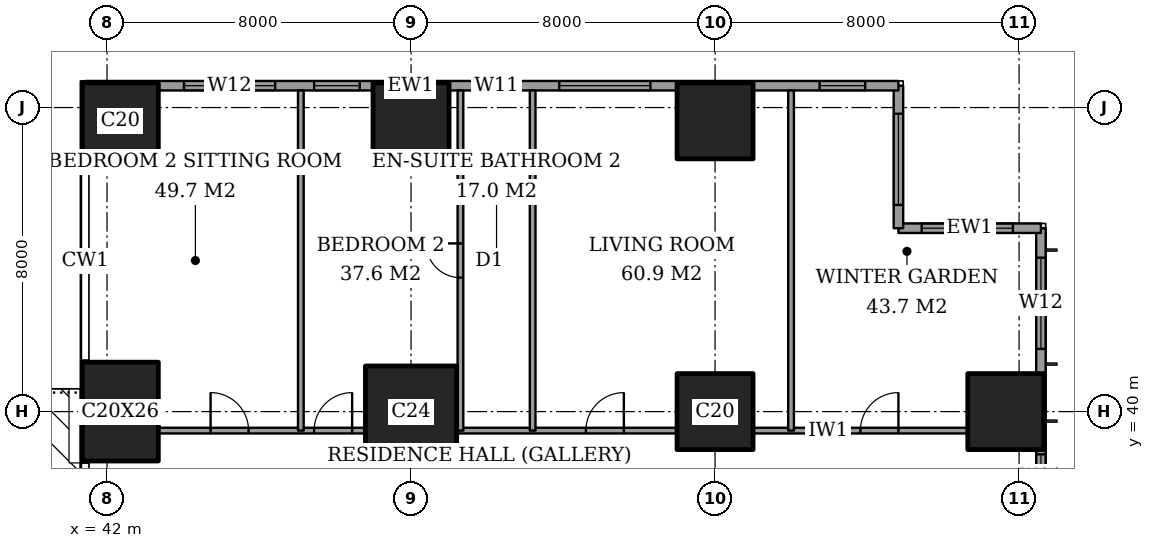
"""IFC4 building model, lengths in metres.
Left out: names, types, materials, properties, quantities, classifications, styles, units other than length and angle.
Written with IfcOpenShell. Run it as: python <this file> out.ifc"""

import sys

from ifc_helpers import new_model, si_unit, direction, frame, frame_2d, origin, origin_2d, place, context, subcontext, project, spatial, rectangle, extrude, element, fill, save


model = new_model("IFC4")
c1 = context("Model", 3, precision=1e-05, world=origin(), true_north=direction((0.0, 1.0)))
c2 = subcontext(c1, "Body", "Model", "MODEL_VIEW")
j1 = project(units=[si_unit("LENGTHUNIT", "METRE"), si_unit("PLANEANGLEUNIT", "RADIAN")], contexts=[c1])
p1 = place(None, origin())
s1 = spatial("IfcSite", under=j1, at=p1, CompositionType="ELEMENT")
p2 = place(p1, origin())
s2 = spatial("IfcBuilding", under=s1, at=p2, CompositionType="ELEMENT")
p3 = place(p2, frame((0.0, 0.0, 96.2)))
s3 = spatial("IfcBuildingStorey", under=s2, at=p3, CompositionType="ELEMENT", Elevation=96.2)
p4 = place(p3, frame((42.35, 40.0, 0.0), z_axis=(0.0, 0.0, 1.0), x_axis=(1.0, 0.0, 0.0)))
e1 = element("IfcColumn", 1, at=p4, inside=s3, PredefinedType="COLUMN", context=c2, shape_type="SweptSolid", body=[
    extrude(rectangle(XDim=2.0, YDim=2.6, at=origin_2d()), origin(), (0.0, 0.0, 1.0), 3.6),
])
p5 = place(p3, frame((42.35, 47.65, 0.0), z_axis=(0.0, 0.0, 1.0), x_axis=(1.0, 0.0, 0.0)))
e2 = element("IfcColumn", 2, at=p5, inside=s3, PredefinedType="COLUMN", context=c2, shape_type="SweptSolid", body=[
    extrude(rectangle(XDim=2.0, YDim=2.0, at=origin_2d()), origin(), (0.0, 0.0, 1.0), 3.6),
])
p6 = place(p3, frame((50.0, 40.0, 0.0), z_axis=(0.0, 0.0, 1.0), x_axis=(1.0, 0.0, 0.0)))
e3 = element("IfcColumn", 3, at=p6, inside=s3, PredefinedType="COLUMN", context=c2, shape_type="SweptSolid", body=[
    extrude(rectangle(XDim=2.4, YDim=2.4, at=origin_2d()), origin(), (0.0, 0.0, 1.0), 3.6),
])
for number, where, z_axis, x_axis in (
    (4, (50.0, 47.65, 0.0), (0.0, 0.0, 1.0), (1.0, 0.0, 0.0)),
    (5, (58.0, 40.0, 0.0), (0.0, 0.0, 1.0), (1.0, 0.0, 0.0)),
    (6, (58.0, 47.65, 0.0), (0.0, 0.0, 1.0), (1.0, 0.0, 0.0)),
    (7, (65.65, 40.0, 0.0), (0.0, 0.0, 1.0), (1.0, 0.0, 0.0)),
):
    element("IfcColumn", number, at=place(p3, frame(where, z_axis=z_axis, x_axis=x_axis)), inside=s3, PredefinedType="COLUMN", context=c2, shape_type="SweptSolid", body=[
        extrude(rectangle(XDim=2.0, YDim=2.0, at=origin_2d()), origin(), (0.0, 0.0, 1.0), 3.6),
    ])
p7 = place(p3, frame((66.575, 3.175, 0.0), z_axis=(0.0, 0.0, 1.0), x_axis=(0.0, 1.0, 0.0)))
e8 = element("IfcWall", 8, at=p7, inside=s3, PredefinedType="SOLIDWALL", context=c2, shape_type="SweptSolid", body=[
    extrude(rectangle(XDim=41.65, YDim=0.25, at=frame_2d((20.825, 0.0))), origin(), (0.0, 0.0, 1.0), 3.6),
])
p8 = place(p7, frame((0.775, 0.0, 0.4)))
e9 = element("IfcOpeningElement", 9, at=p8, cuts=e8, PredefinedType="OPENING", context=c2, shape_type="SweptSolid", body=[
    extrude(rectangle(XDim=2.4, YDim=2.2, at=frame_2d((1.2, 1.1))), frame((0.0, 0.135, 0.0), z_axis=(0.0, -1.0, 0.0), x_axis=(1.0, 0.0, 0.0)), (0.0, 0.0, 1.0), 0.27),
])
p9 = place(p7, frame((6.1, 0.0, 0.4)))
e10 = element("IfcOpeningElement", 10, at=p9, cuts=e8, PredefinedType="OPENING", context=c2, shape_type="SweptSolid", body=[
    extrude(rectangle(XDim=1.2, YDim=2.2, at=frame_2d((0.6, 1.1))), frame((0.0, 0.135, 0.0), z_axis=(0.0, -1.0, 0.0), x_axis=(1.0, 0.0, 0.0)), (0.0, 0.0, 1.0), 0.27),
])
p10 = place(p7, frame((8.275, 0.0, 0.4)))
e11 = element("IfcOpeningElement", 11, at=p10, cuts=e8, PredefinedType="OPENING", context=c2, shape_type="SweptSolid", body=[
    extrude(rectangle(XDim=2.4, YDim=2.2, at=frame_2d((1.2, 1.1))), frame((0.0, 0.135, 0.0), z_axis=(0.0, -1.0, 0.0), x_axis=(1.0, 0.0, 0.0)), (0.0, 0.0, 1.0), 0.27),
])
p11 = place(p7, frame((15.775, 0.0, 0.4)))
e12 = element("IfcOpeningElement", 12, at=p11, cuts=e8, PredefinedType="OPENING", context=c2, shape_type="SweptSolid", body=[
    extrude(rectangle(XDim=2.4, YDim=2.2, at=frame_2d((1.2, 1.1))), frame((0.0, 0.135, 0.0), z_axis=(0.0, -1.0, 0.0), x_axis=(1.0, 0.0, 0.0)), (0.0, 0.0, 1.0), 0.27),
])
p12 = place(p7, frame((23.475, 0.0, 0.4)))
e13 = element("IfcOpeningElement", 13, at=p12, cuts=e8, PredefinedType="OPENING", context=c2, shape_type="SweptSolid", body=[
    extrude(rectangle(XDim=2.4, YDim=2.2, at=frame_2d((1.2, 1.1))), frame((0.0, 0.135, 0.0), z_axis=(0.0, -1.0, 0.0), x_axis=(1.0, 0.0, 0.0)), (0.0, 0.0, 1.0), 0.27),
])
p13 = place(p7, frame((30.975, 0.0, 0.4)))
e14 = element("IfcOpeningElement", 14, at=p13, cuts=e8, PredefinedType="OPENING", context=c2, shape_type="SweptSolid", body=[
    extrude(rectangle(XDim=2.4, YDim=2.2, at=frame_2d((1.2, 1.1))), frame((0.0, 0.135, 0.0), z_axis=(0.0, -1.0, 0.0), x_axis=(1.0, 0.0, 0.0)), (0.0, 0.0, 1.0), 0.27),
])
p14 = place(p7, frame((34.5, 0.0, 0.4)))
e15 = element("IfcOpeningElement", 15, at=p14, cuts=e8, PredefinedType="OPENING", context=c2, shape_type="SweptSolid", body=[
    extrude(rectangle(XDim=1.2, YDim=2.2, at=frame_2d((0.6, 1.1))), frame((0.0, 0.135, 0.0), z_axis=(0.0, -1.0, 0.0), x_axis=(1.0, 0.0, 0.0)), (0.0, 0.0, 1.0), 0.27),
])
p15 = place(p7, frame((38.475, 0.0, 0.4)))
e16 = element("IfcOpeningElement", 16, at=p15, cuts=e8, PredefinedType="OPENING", context=c2, shape_type="SweptSolid", body=[
    extrude(rectangle(XDim=2.4, YDim=2.2, at=frame_2d((1.2, 1.1))), frame((0.0, 0.135, 0.0), z_axis=(0.0, -1.0, 0.0), x_axis=(1.0, 0.0, 0.0)), (0.0, 0.0, 1.0), 0.27),
])
p16 = place(p3, frame((66.575, 44.825, 0.0), z_axis=(0.0, 0.0, 1.0), x_axis=(-1.0, 0.0, 0.0)))
e17 = element("IfcWall", 17, at=p16, inside=s3, PredefinedType="SOLIDWALL", context=c2, shape_type="SweptSolid", body=[
    extrude(rectangle(XDim=3.75, YDim=0.25, at=frame_2d((1.875, 0.0))), origin(), (0.0, 0.0, 1.0), 3.6),
])
p17 = place(p16, frame((0.738, 0.0, 0.4)))
e18 = element("IfcOpeningElement", 18, at=p17, cuts=e17, PredefinedType="OPENING", context=c2, shape_type="SweptSolid", body=[
    extrude(rectangle(XDim=2.4, YDim=2.2, at=frame_2d((1.2, 1.1))), frame((0.0, 0.135, 0.0), z_axis=(0.0, -1.0, 0.0), x_axis=(1.0, 0.0, 0.0)), (0.0, 0.0, 1.0), 0.27),
])
p18 = place(p3, frame((62.825, 44.825, 0.0), z_axis=(0.0, 0.0, 1.0), x_axis=(0.0, 1.0, 0.0)))
e19 = element("IfcWall", 19, at=p18, inside=s3, PredefinedType="SOLIDWALL", context=c2, shape_type="SweptSolid", body=[
    extrude(rectangle(XDim=3.75, YDim=0.25, at=frame_2d((1.875, 0.0))), origin(), (0.0, 0.0, 1.0), 3.6),
])
p19 = place(p18, frame((0.613, 0.0, 0.4)))
e20 = element("IfcOpeningElement", 20, at=p19, cuts=e19, PredefinedType="OPENING", context=c2, shape_type="SweptSolid", body=[
    extrude(rectangle(XDim=2.4, YDim=2.2, at=frame_2d((1.2, 1.1))), frame((0.0, 0.135, 0.0), z_axis=(0.0, -1.0, 0.0), x_axis=(1.0, 0.0, 0.0)), (0.0, 0.0, 1.0), 0.27),
])
p20 = place(p3, frame((62.825, 48.575, 0.0), z_axis=(0.0, 0.0, 1.0), x_axis=(-1.0, 0.0, 0.0)))
e21 = element("IfcWall", 21, at=p20, inside=s3, PredefinedType="SOLIDWALL", context=c2, shape_type="SweptSolid", body=[
    extrude(rectangle(XDim=21.4, YDim=0.25, at=frame_2d((10.7, 0.0))), origin(), (0.0, 0.0, 1.0), 3.6),
])
p21 = place(p20, frame((0.875, 0.0, 0.4)))
e22 = element("IfcOpeningElement", 22, at=p21, cuts=e21, PredefinedType="OPENING", context=c2, shape_type="SweptSolid", body=[
    extrude(rectangle(XDim=1.2, YDim=2.2, at=frame_2d((0.6, 1.1))), frame((0.0, 0.135, 0.0), z_axis=(0.0, -1.0, 0.0), x_axis=(1.0, 0.0, 0.0)), (0.0, 0.0, 1.0), 0.27),
])
p22 = place(p20, frame((6.525, 0.0, 0.4)))
e23 = element("IfcOpeningElement", 23, at=p22, cuts=e21, PredefinedType="OPENING", context=c2, shape_type="SweptSolid", body=[
    extrude(rectangle(XDim=2.4, YDim=2.2, at=frame_2d((1.2, 1.1))), frame((0.0, 0.135, 0.0), z_axis=(0.0, -1.0, 0.0), x_axis=(1.0, 0.0, 0.0)), (0.0, 0.0, 1.0), 0.27),
])
p23 = place(p20, frame((9.975, 0.0, 0.4)))
e24 = element("IfcOpeningElement", 24, at=p23, cuts=e21, PredefinedType="OPENING", context=c2, shape_type="SweptSolid", body=[
    extrude(rectangle(XDim=1.2, YDim=2.2, at=frame_2d((0.6, 1.1))), frame((0.0, 0.135, 0.0), z_axis=(0.0, -1.0, 0.0), x_axis=(1.0, 0.0, 0.0)), (0.0, 0.0, 1.0), 0.27),
])
p24 = place(p20, frame((14.175, 0.0, 0.4)))
e25 = element("IfcOpeningElement", 25, at=p24, cuts=e21, PredefinedType="OPENING", context=c2, shape_type="SweptSolid", body=[
    extrude(rectangle(XDim=1.2, YDim=2.2, at=frame_2d((0.6, 1.1))), frame((0.0, 0.135, 0.0), z_axis=(0.0, -1.0, 0.0), x_axis=(1.0, 0.0, 0.0)), (0.0, 0.0, 1.0), 0.27),
])
p25 = place(p20, frame((16.4, 0.0, 0.4)))
e26 = element("IfcOpeningElement", 26, at=p25, cuts=e21, PredefinedType="OPENING", context=c2, shape_type="SweptSolid", body=[
    extrude(rectangle(XDim=2.4, YDim=2.2, at=frame_2d((1.2, 1.1))), frame((0.0, 0.135, 0.0), z_axis=(0.0, -1.0, 0.0), x_axis=(1.0, 0.0, 0.0)), (0.0, 0.0, 1.0), 0.27),
])
p26 = place(p3, frame((43.35, 39.5, 0.0), z_axis=(0.0, 0.0, 1.0), x_axis=(1.0, 0.0, 0.0)))
e27 = element("IfcWall", 27, at=p26, inside=s3, PredefinedType="PARTITIONING", context=c2, shape_type="SweptSolid", body=[
    extrude(rectangle(XDim=5.45, YDim=0.15, at=frame_2d((2.725, 0.0))), origin(), (0.0, 0.0, 1.0), 3.35),
])
p27 = place(p26, frame((4.1, 0.0, 0.0)))
e28 = element("IfcOpeningElement", 28, at=p27, cuts=e27, PredefinedType="OPENING", context=c2, shape_type="SweptSolid", body=[
    extrude(rectangle(XDim=1.0, YDim=2.1, at=frame_2d((0.5, 1.05))), frame((0.0, 0.085, 0.0), z_axis=(0.0, -1.0, 0.0), x_axis=(1.0, 0.0, 0.0)), (0.0, 0.0, 1.0), 0.17),
])
p28 = place(p26, frame((1.375, 0.0, 0.0)))
e29 = element("IfcOpeningElement", 29, at=p28, cuts=e27, PredefinedType="OPENING", context=c2, shape_type="SweptSolid", body=[
    extrude(rectangle(XDim=1.0, YDim=2.1, at=frame_2d((0.5, 1.05))), frame((0.0, 0.085, 0.0), z_axis=(0.0, -1.0, 0.0), x_axis=(1.0, 0.0, 0.0)), (0.0, 0.0, 1.0), 0.17),
])
p29 = place(p3, frame((51.2, 39.5, 0.0), z_axis=(0.0, 0.0, 1.0), x_axis=(1.0, 0.0, 0.0)))
e30 = element("IfcWall", 30, at=p29, inside=s3, PredefinedType="PARTITIONING", context=c2, shape_type="SweptSolid", body=[
    extrude(rectangle(XDim=5.8, YDim=0.15, at=frame_2d((2.9, 0.0))), origin(), (0.0, 0.0, 1.0), 3.35),
])
p30 = place(p29, frame((3.4, 0.0, 0.0)))
e31 = element("IfcOpeningElement", 31, at=p30, cuts=e30, PredefinedType="OPENING", context=c2, shape_type="SweptSolid", body=[
    extrude(rectangle(XDim=1.0, YDim=2.1, at=frame_2d((0.5, 1.05))), frame((0.0, 0.085, 0.0), z_axis=(0.0, -1.0, 0.0), x_axis=(1.0, 0.0, 0.0)), (0.0, 0.0, 1.0), 0.17),
])
p31 = place(p3, frame((59.0, 39.5, 0.0), z_axis=(0.0, 0.0, 1.0), x_axis=(1.0, 0.0, 0.0)))
e32 = element("IfcWall", 32, at=p31, inside=s3, PredefinedType="PARTITIONING", context=c2, shape_type="SweptSolid", body=[
    extrude(rectangle(XDim=5.65, YDim=0.15, at=frame_2d((2.825, 0.0))), origin(), (0.0, 0.0, 1.0), 3.35),
])
p32 = place(p31, frame((2.825, 0.0, 0.0)))
e33 = element("IfcOpeningElement", 33, at=p32, cuts=e32, PredefinedType="OPENING", context=c2, shape_type="SweptSolid", body=[
    extrude(rectangle(XDim=1.0, YDim=2.1, at=frame_2d((0.5, 1.05))), frame((0.0, 0.085, 0.0), z_axis=(0.0, -1.0, 0.0), x_axis=(1.0, 0.0, 0.0)), (0.0, 0.0, 1.0), 0.17),
])
p33 = place(p3, frame((47.1, 39.5, 0.0), z_axis=(0.0, 0.0, 1.0), x_axis=(0.0, 1.0, 0.0)))
e34 = element("IfcWall", 34, at=p33, inside=s3, PredefinedType="PARTITIONING", context=c2, shape_type="SweptSolid", body=[
    extrude(rectangle(XDim=8.95, YDim=0.15, at=frame_2d((4.475, 0.0))), origin(), (0.0, 0.0, 1.0), 3.35),
])
p34 = place(p3, frame((51.3, 39.5, 0.0), z_axis=(0.0, 0.0, 1.0), x_axis=(0.0, 1.0, 0.0)))
e35 = element("IfcWall", 35, at=p34, inside=s3, PredefinedType="PARTITIONING", context=c2, shape_type="SweptSolid", body=[
    extrude(rectangle(XDim=8.95, YDim=0.15, at=frame_2d((4.475, 0.0))), origin(), (0.0, 0.0, 1.0), 3.35),
])
p35 = place(p34, frame((4.025, 0.0, 0.0)))
e36 = element("IfcOpeningElement", 36, at=p35, cuts=e35, PredefinedType="OPENING", context=c2, shape_type="SweptSolid", body=[
    extrude(rectangle(XDim=0.9, YDim=2.1, at=frame_2d((0.45, 1.05))), frame((0.0, 0.085, 0.0), z_axis=(0.0, -1.0, 0.0), x_axis=(1.0, 0.0, 0.0)), (0.0, 0.0, 1.0), 0.17),
])
for number, where, z_axis, x_axis in (
    (37, (53.2, 39.5, 0.0), (0.0, 0.0, 1.0), (0.0, 1.0, 0.0)),
    (38, (60.0, 39.5, 0.0), (0.0, 0.0, 1.0), (0.0, 1.0, 0.0)),
):
    element("IfcWall", number, at=place(p3, frame(where, z_axis=z_axis, x_axis=x_axis)), inside=s3, PredefinedType="PARTITIONING", context=c2, shape_type="SweptSolid", body=[
        extrude(rectangle(XDim=8.95, YDim=0.15, at=frame_2d((4.475, 0.0))), origin(), (0.0, 0.0, 1.0), 3.35),
    ])
p36 = place(p14, origin())
e39 = element("IfcWindow", 39, at=p36, inside=s3, PartitioningType="SINGLE_PANEL", PredefinedType="WINDOW", context=c2, shape_type="SweptSolid", body=[
    extrude(rectangle(XDim=1.2, YDim=2.2, at=frame_2d((0.6, 1.1))), frame((0.0, 0.03, 0.0), z_axis=(0.0, -1.0, 0.0), x_axis=(1.0, 0.0, 0.0)), (0.0, 0.0, 1.0), 0.06),
])
fill(e15, e39)
p37 = place(p15, origin())
e40 = element("IfcWindow", 40, at=p37, inside=s3, PartitioningType="SINGLE_PANEL", PredefinedType="WINDOW", context=c2, shape_type="SweptSolid", body=[
    extrude(rectangle(XDim=2.4, YDim=2.2, at=frame_2d((1.2, 1.1))), frame((0.0, 0.03, 0.0), z_axis=(0.0, -1.0, 0.0), x_axis=(1.0, 0.0, 0.0)), (0.0, 0.0, 1.0), 0.06),
])
fill(e16, e40)
p38 = place(p17, origin())
e41 = element("IfcWindow", 41, at=p38, inside=s3, PartitioningType="SINGLE_PANEL", PredefinedType="WINDOW", context=c2, shape_type="SweptSolid", body=[
    extrude(rectangle(XDim=2.4, YDim=2.2, at=frame_2d((1.2, 1.1))), frame((0.0, 0.03, 0.0), z_axis=(0.0, -1.0, 0.0), x_axis=(1.0, 0.0, 0.0)), (0.0, 0.0, 1.0), 0.06),
])
fill(e18, e41)
p39 = place(p19, origin())
e42 = element("IfcWindow", 42, at=p39, inside=s3, PartitioningType="SINGLE_PANEL", PredefinedType="WINDOW", context=c2, shape_type="SweptSolid", body=[
    extrude(rectangle(XDim=2.4, YDim=2.2, at=frame_2d((1.2, 1.1))), frame((0.0, 0.03, 0.0), z_axis=(0.0, -1.0, 0.0), x_axis=(1.0, 0.0, 0.0)), (0.0, 0.0, 1.0), 0.06),
])
fill(e20, e42)
p40 = place(p21, origin())
e43 = element("IfcWindow", 43, at=p40, inside=s3, PartitioningType="SINGLE_PANEL", PredefinedType="WINDOW", context=c2, shape_type="SweptSolid", body=[
    extrude(rectangle(XDim=1.2, YDim=2.2, at=frame_2d((0.6, 1.1))), frame((0.0, 0.03, 0.0), z_axis=(0.0, -1.0, 0.0), x_axis=(1.0, 0.0, 0.0)), (0.0, 0.0, 1.0), 0.06),
])
fill(e22, e43)
p41 = place(p22, origin())
e44 = element("IfcWindow", 44, at=p41, inside=s3, PartitioningType="SINGLE_PANEL", PredefinedType="WINDOW", context=c2, shape_type="SweptSolid", body=[
    extrude(rectangle(XDim=2.4, YDim=2.2, at=frame_2d((1.2, 1.1))), frame((0.0, 0.03, 0.0), z_axis=(0.0, -1.0, 0.0), x_axis=(1.0, 0.0, 0.0)), (0.0, 0.0, 1.0), 0.06),
])
fill(e23, e44)
p42 = place(p23, origin())
e45 = element("IfcWindow", 45, at=p42, inside=s3, PartitioningType="SINGLE_PANEL", PredefinedType="WINDOW", context=c2, shape_type="SweptSolid", body=[
    extrude(rectangle(XDim=1.2, YDim=2.2, at=frame_2d((0.6, 1.1))), frame((0.0, 0.03, 0.0), z_axis=(0.0, -1.0, 0.0), x_axis=(1.0, 0.0, 0.0)), (0.0, 0.0, 1.0), 0.06),
])
fill(e24, e45)
p43 = place(p24, origin())
e46 = element("IfcWindow", 46, at=p43, inside=s3, PartitioningType="SINGLE_PANEL", PredefinedType="WINDOW", context=c2, shape_type="SweptSolid", body=[
    extrude(rectangle(XDim=1.2, YDim=2.2, at=frame_2d((0.6, 1.1))), frame((0.0, 0.03, 0.0), z_axis=(0.0, -1.0, 0.0), x_axis=(1.0, 0.0, 0.0)), (0.0, 0.0, 1.0), 0.06),
])
fill(e25, e46)
p44 = place(p25, origin())
e47 = element("IfcWindow", 47, at=p44, inside=s3, PartitioningType="SINGLE_PANEL", PredefinedType="WINDOW", context=c2, shape_type="SweptSolid", body=[
    extrude(rectangle(XDim=2.4, YDim=2.2, at=frame_2d((1.2, 1.1))), frame((0.0, 0.03, 0.0), z_axis=(0.0, -1.0, 0.0), x_axis=(1.0, 0.0, 0.0)), (0.0, 0.0, 1.0), 0.06),
])
fill(e26, e47)
p45 = place(p32, origin())
e48 = element("IfcDoor", 48, at=p45, inside=s3, OperationType="SINGLE_SWING_LEFT", PredefinedType="DOOR", context=c2, shape_type="SweptSolid", body=[
    extrude(rectangle(XDim=1.0, YDim=2.1, at=frame_2d((0.5, 1.05))), frame((0.0, 0.025, 0.0), z_axis=(0.0, -1.0, 0.0), x_axis=(1.0, 0.0, 0.0)), (0.0, 0.0, 1.0), 0.05),
])
fill(e33, e48)
p46 = place(p30, origin())
e49 = element("IfcDoor", 49, at=p46, inside=s3, OperationType="SINGLE_SWING_LEFT", PredefinedType="DOOR", context=c2, shape_type="SweptSolid", body=[
    extrude(rectangle(XDim=1.0, YDim=2.1, at=frame_2d((0.5, 1.05))), frame((0.0, 0.025, 0.0), z_axis=(0.0, -1.0, 0.0), x_axis=(1.0, 0.0, 0.0)), (0.0, 0.0, 1.0), 0.05),
])
fill(e31, e49)
p47 = place(p35, origin())
e50 = element("IfcDoor", 50, at=p47, inside=s3, OperationType="SINGLE_SWING_LEFT", PredefinedType="DOOR", context=c2, shape_type="SweptSolid", body=[
    extrude(rectangle(XDim=0.9, YDim=2.1, at=frame_2d((0.45, 1.05))), frame((0.0, 0.025, 0.0), z_axis=(0.0, -1.0, 0.0), x_axis=(1.0, 0.0, 0.0)), (0.0, 0.0, 1.0), 0.05),
])
fill(e36, e50)
p48 = place(p27, origin())
e51 = element("IfcDoor", 51, at=p48, inside=s3, OperationType="SINGLE_SWING_LEFT", PredefinedType="DOOR", context=c2, shape_type="SweptSolid", body=[
    extrude(rectangle(XDim=1.0, YDim=2.1, at=frame_2d((0.5, 1.05))), frame((0.0, 0.025, 0.0), z_axis=(0.0, -1.0, 0.0), x_axis=(1.0, 0.0, 0.0)), (0.0, 0.0, 1.0), 0.05),
])
fill(e28, e51)
p49 = place(p28, origin())
e52 = element("IfcDoor", 52, at=p49, inside=s3, OperationType="SINGLE_SWING_RIGHT", PredefinedType="DOOR", context=c2, shape_type="SweptSolid", body=[
    extrude(rectangle(XDim=1.0, YDim=2.1, at=frame_2d((0.5, 1.05))), frame((0.0, 0.025, 0.0), z_axis=(0.0, -1.0, 0.0), x_axis=(1.0, 0.0, 0.0)), (0.0, 0.0, 1.0), 0.05),
])
fill(e29, e52)
save(model, sys.argv[1])
